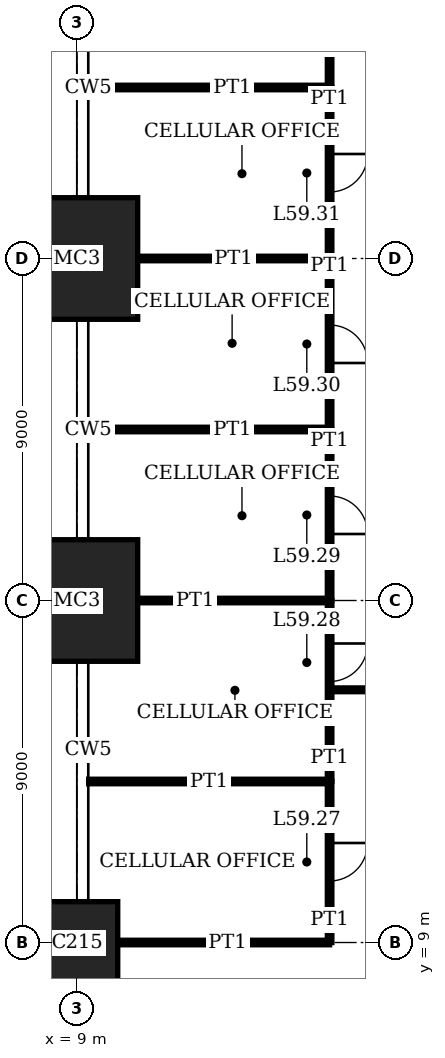
"""IFC4 building model, lengths in metres.
Left out: names, types, materials, properties, quantities, classifications, styles, units other than length and angle.
Written with IfcOpenShell. Run it as: python <this file> out.ifc"""

import sys

from ifc_helpers import new_model, si_unit, direction, frame, frame_2d, origin, origin_2d, place, context, subcontext, project, spatial, rectangle, extrude, element, fill, save


model = new_model("IFC4")
c1 = context("Model", 3, precision=1e-05, world=origin(), true_north=direction((0.0, 1.0)))
c2 = subcontext(c1, "Body", "Model", "MODEL_VIEW")
j1 = project(units=[si_unit("LENGTHUNIT", "METRE"), si_unit("PLANEANGLEUNIT", "RADIAN")], contexts=[c1])
p1 = place(None, origin())
s1 = spatial("IfcSite", under=j1, at=p1, CompositionType="ELEMENT")
p2 = place(p1, origin())
s2 = spatial("IfcBuilding", under=s1, at=p2, CompositionType="ELEMENT")
p3 = place(p2, frame((0.0, 0.0, 243.4)))
s3 = spatial("IfcBuildingStorey", under=s2, at=p3, CompositionType="ELEMENT", Elevation=243.4)
p4 = place(p3, frame((9.0, 9.0, 0.0), z_axis=(0.0, 0.0, 1.0), x_axis=(1.0, 0.0, 0.0)))
e1 = element("IfcColumn", 1, at=p4, inside=s3, PredefinedType="COLUMN", context=c2, shape_type="SweptSolid", body=[
    extrude(rectangle(XDim=2.15, YDim=2.15, at=origin_2d()), origin(), (0.0, 0.0, 1.0), 4.0),
])
for number, where, z_axis, x_axis in (
    (2, (9.0, 18.0, 0.0), (0.0, 0.0, 1.0), (1.0, 0.0, 0.0)),
    (3, (9.0, 27.0, 0.0), (0.0, 0.0, 1.0), (1.0, 0.0, 0.0)),
):
    element("IfcColumn", number, at=place(p3, frame(where, z_axis=z_axis, x_axis=x_axis)), inside=s3, PredefinedType="COLUMN", context=c2, shape_type="SweptSolid", body=[
        extrude(rectangle(XDim=3.2, YDim=3.2, at=origin_2d()), origin(), (0.0, 0.0, 1.0), 4.0),
    ])
p5 = place(p3, frame((10.075, 9.0, 0.0), z_axis=(0.0, 0.0, 1.0), x_axis=(1.0, 0.0, 0.0)))
e4 = element("IfcWall", 4, at=p5, inside=s3, PredefinedType="PARTITIONING", context=c2, shape_type="SweptSolid", body=[
    extrude(rectangle(XDim=5.575, YDim=0.12, at=frame_2d((2.788, 0.0))), origin(), (0.0, 0.0, 1.0), 3.05),
])
p6 = place(p3, frame((9.31, 13.238, 0.0), z_axis=(0.0, 0.0, 1.0), x_axis=(1.0, 0.0, 0.0)))
e5 = element("IfcWall", 5, at=p6, inside=s3, PredefinedType="PARTITIONING", context=c2, shape_type="SweptSolid", body=[
    extrude(rectangle(XDim=6.34, YDim=0.12, at=frame_2d((3.17, 0.0))), origin(), (0.0, 0.0, 1.0), 3.1),
])
p7 = place(p3, frame((15.66, 15.65, 0.0), z_axis=(0.0, 0.0, 1.0), x_axis=(1.0, 0.0, 0.0)))
e6 = element("IfcWall", 6, at=p7, inside=s3, PredefinedType="PARTITIONING", context=c2, shape_type="SweptSolid", body=[
    extrude(rectangle(XDim=2.33, YDim=0.1, at=frame_2d((1.165, 0.0))), origin(), (0.0, 0.0, 1.0), 3.75),
])
p8 = place(p3, frame((10.6, 18.0, 0.0), z_axis=(0.0, 0.0, 1.0), x_axis=(1.0, 0.0, 0.0)))
e7 = element("IfcWall", 7, at=p8, inside=s3, PredefinedType="PARTITIONING", context=c2, shape_type="SweptSolid", body=[
    extrude(rectangle(XDim=5.05, YDim=0.12, at=frame_2d((2.525, 0.0))), origin(), (0.0, 0.0, 1.0), 3.05),
])
p9 = place(p3, frame((9.31, 22.5, 0.0), z_axis=(0.0, 0.0, 1.0), x_axis=(1.0, 0.0, 0.0)))
e8 = element("IfcWall", 8, at=p9, inside=s3, PredefinedType="PARTITIONING", context=c2, shape_type="SweptSolid", body=[
    extrude(rectangle(XDim=6.34, YDim=0.12, at=frame_2d((3.17, 0.0))), origin(), (0.0, 0.0, 1.0), 3.1),
])
p10 = place(p3, frame((10.6, 27.0, 0.0), z_axis=(0.0, 0.0, 1.0), x_axis=(1.0, 0.0, 0.0)))
e9 = element("IfcWall", 9, at=p10, inside=s3, PredefinedType="PARTITIONING", context=c2, shape_type="SweptSolid", body=[
    extrude(rectangle(XDim=5.05, YDim=0.12, at=frame_2d((2.525, 0.0))), origin(), (0.0, 0.0, 1.0), 3.05),
])
p11 = place(p3, frame((9.31, 31.5, 0.0), z_axis=(0.0, 0.0, 1.0), x_axis=(1.0, 0.0, 0.0)))
e10 = element("IfcWall", 10, at=p11, inside=s3, PredefinedType="PARTITIONING", context=c2, shape_type="SweptSolid", body=[
    extrude(rectangle(XDim=6.34, YDim=0.12, at=frame_2d((3.17, 0.0))), origin(), (0.0, 0.0, 1.0), 3.1),
])
p12 = place(p3, frame((15.65, 9.0, 0.0), z_axis=(0.0, 0.0, 1.0), x_axis=(0.0, 1.0, 0.0)))
e11 = element("IfcWall", 11, at=p12, inside=s3, PredefinedType="PARTITIONING", context=c2, shape_type="SweptSolid", body=[
    extrude(rectangle(XDim=4.238, YDim=0.12, at=frame_2d((2.119, 0.0))), origin(), (0.0, 0.0, 1.0), 3.75),
])
p13 = place(p12, frame((1.619, 0.0, 0.0)))
e12 = element("IfcOpeningElement", 12, at=p13, cuts=e11, PredefinedType="OPENING", context=c2, shape_type="SweptSolid", body=[
    extrude(rectangle(XDim=1.0, YDim=2.4, at=frame_2d((0.5, 1.2))), frame((0.0, 0.07, 0.0), z_axis=(0.0, -1.0, 0.0), x_axis=(1.0, 0.0, 0.0)), (0.0, 0.0, 1.0), 0.14),
])
p14 = place(p3, frame((15.65, 13.238, 0.0), z_axis=(0.0, 0.0, 1.0), x_axis=(0.0, 1.0, 0.0)))
e13 = element("IfcWall", 13, at=p14, inside=s3, PredefinedType="PARTITIONING", context=c2, shape_type="SweptSolid", body=[
    extrude(rectangle(XDim=4.762, YDim=0.12, at=frame_2d((2.381, 0.0))), origin(), (0.0, 0.0, 1.0), 3.75),
])
p15 = place(p14, frame((2.632, 0.0, 0.0)))
e14 = element("IfcOpeningElement", 14, at=p15, cuts=e13, PredefinedType="OPENING", context=c2, shape_type="SweptSolid", body=[
    extrude(rectangle(XDim=1.0, YDim=2.4, at=frame_2d((0.5, 1.2))), frame((0.0, 0.07, 0.0), z_axis=(0.0, -1.0, 0.0), x_axis=(1.0, 0.0, 0.0)), (0.0, 0.0, 1.0), 0.14),
])
p16 = place(p3, frame((15.65, 18.0, 0.0), z_axis=(0.0, 0.0, 1.0), x_axis=(0.0, 1.0, 0.0)))
e15 = element("IfcWall", 15, at=p16, inside=s3, PredefinedType="PARTITIONING", context=c2, shape_type="SweptSolid", body=[
    extrude(rectangle(XDim=4.5, YDim=0.12, at=frame_2d((2.25, 0.0))), origin(), (0.0, 0.0, 1.0), 3.75),
])
p17 = place(p16, frame((1.75, 0.0, 0.0)))
e16 = element("IfcOpeningElement", 16, at=p17, cuts=e15, PredefinedType="OPENING", context=c2, shape_type="SweptSolid", body=[
    extrude(rectangle(XDim=1.0, YDim=2.4, at=frame_2d((0.5, 1.2))), frame((0.0, 0.07, 0.0), z_axis=(0.0, -1.0, 0.0), x_axis=(1.0, 0.0, 0.0)), (0.0, 0.0, 1.0), 0.14),
])
p18 = place(p3, frame((15.65, 22.5, 0.0), z_axis=(0.0, 0.0, 1.0), x_axis=(0.0, 1.0, 0.0)))
e17 = element("IfcWall", 17, at=p18, inside=s3, PredefinedType="PARTITIONING", context=c2, shape_type="SweptSolid", body=[
    extrude(rectangle(XDim=4.5, YDim=0.12, at=frame_2d((2.25, 0.0))), origin(), (0.0, 0.0, 1.0), 3.75),
])
p19 = place(p18, frame((1.75, 0.0, 0.0)))
e18 = element("IfcOpeningElement", 18, at=p19, cuts=e17, PredefinedType="OPENING", context=c2, shape_type="SweptSolid", body=[
    extrude(rectangle(XDim=1.0, YDim=2.4, at=frame_2d((0.5, 1.2))), frame((0.0, 0.07, 0.0), z_axis=(0.0, -1.0, 0.0), x_axis=(1.0, 0.0, 0.0)), (0.0, 0.0, 1.0), 0.14),
])
p20 = place(p3, frame((15.65, 27.0, 0.0), z_axis=(0.0, 0.0, 1.0), x_axis=(0.0, 1.0, 0.0)))
e19 = element("IfcWall", 19, at=p20, inside=s3, PredefinedType="PARTITIONING", context=c2, shape_type="SweptSolid", body=[
    extrude(rectangle(XDim=4.5, YDim=0.12, at=frame_2d((2.25, 0.0))), origin(), (0.0, 0.0, 1.0), 3.75),
])
p21 = place(p20, frame((1.75, 0.0, 0.0)))
e20 = element("IfcOpeningElement", 20, at=p21, cuts=e19, PredefinedType="OPENING", context=c2, shape_type="SweptSolid", body=[
    extrude(rectangle(XDim=1.0, YDim=2.4, at=frame_2d((0.5, 1.2))), frame((0.0, 0.07, 0.0), z_axis=(0.0, -1.0, 0.0), x_axis=(1.0, 0.0, 0.0)), (0.0, 0.0, 1.0), 0.14),
])
p22 = place(p3, frame((15.65, 31.5, 0.0), z_axis=(0.0, 0.0, 1.0), x_axis=(0.0, 1.0, 0.0)))
e21 = element("IfcWall", 21, at=p22, inside=s3, PredefinedType="PARTITIONING", context=c2, shape_type="SweptSolid", body=[
    extrude(rectangle(XDim=4.5, YDim=0.12, at=frame_2d((2.25, 0.0))), origin(), (0.0, 0.0, 1.0), 3.75),
])
p23 = place(p22, frame((1.75, 0.0, 0.0)))
e22 = element("IfcOpeningElement", 22, at=p23, cuts=e21, PredefinedType="OPENING", context=c2, shape_type="SweptSolid", body=[
    extrude(rectangle(XDim=1.0, YDim=2.4, at=frame_2d((0.5, 1.2))), frame((0.0, 0.07, 0.0), z_axis=(0.0, -1.0, 0.0), x_axis=(1.0, 0.0, 0.0)), (0.0, 0.0, 1.0), 0.14),
])
p24 = place(p13, origin())
e23 = element("IfcDoor", 23, at=p24, inside=s3, OperationType="SINGLE_SWING_RIGHT", PredefinedType="DOOR", context=c2, shape_type="SweptSolid", body=[
    extrude(rectangle(XDim=1.0, YDim=2.4, at=frame_2d((0.5, 1.2))), frame((0.0, 0.025, 0.0), z_axis=(0.0, -1.0, 0.0), x_axis=(1.0, 0.0, 0.0)), (0.0, 0.0, 1.0), 0.05),
])
fill(e12, e23)
p25 = place(p15, origin())
e24 = element("IfcDoor", 24, at=p25, inside=s3, OperationType="SINGLE_SWING_RIGHT", PredefinedType="DOOR", context=c2, shape_type="SweptSolid", body=[
    extrude(rectangle(XDim=1.0, YDim=2.4, at=frame_2d((0.5, 1.2))), frame((0.0, 0.025, 0.0), z_axis=(0.0, -1.0, 0.0), x_axis=(1.0, 0.0, 0.0)), (0.0, 0.0, 1.0), 0.05),
])
fill(e14, e24)
p26 = place(p17, origin())
e25 = element("IfcDoor", 25, at=p26, inside=s3, OperationType="SINGLE_SWING_LEFT", PredefinedType="DOOR", context=c2, shape_type="SweptSolid", body=[
    extrude(rectangle(XDim=1.0, YDim=2.4, at=frame_2d((0.5, 1.2))), frame((0.0, 0.025, 0.0), z_axis=(0.0, -1.0, 0.0), x_axis=(1.0, 0.0, 0.0)), (0.0, 0.0, 1.0), 0.05),
])
fill(e16, e25)
p27 = place(p19, origin())
e26 = element("IfcDoor", 26, at=p27, inside=s3, OperationType="SINGLE_SWING_LEFT", PredefinedType="DOOR", context=c2, shape_type="SweptSolid", body=[
    extrude(rectangle(XDim=1.0, YDim=2.4, at=frame_2d((0.5, 1.2))), frame((0.0, 0.025, 0.0), z_axis=(0.0, -1.0, 0.0), x_axis=(1.0, 0.0, 0.0)), (0.0, 0.0, 1.0), 0.05),
])
fill(e18, e26)
p28 = place(p21, origin())
e27 = element("IfcDoor", 27, at=p28, inside=s3, OperationType="SINGLE_SWING_RIGHT", PredefinedType="DOOR", context=c2, shape_type="SweptSolid", body=[
    extrude(rectangle(XDim=1.0, YDim=2.4, at=frame_2d((0.5, 1.2))), frame((0.0, 0.025, 0.0), z_axis=(0.0, -1.0, 0.0), x_axis=(1.0, 0.0, 0.0)), (0.0, 0.0, 1.0), 0.05),
])
fill(e20, e27)
save(model, sys.argv[1])
